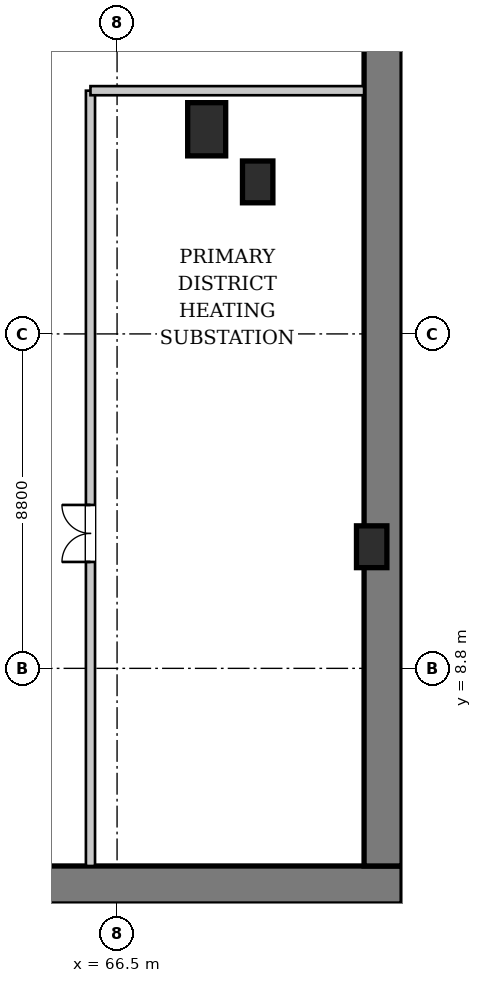
"""IFC4 building model, lengths in metres.
Left out: names, types, materials, properties, quantities, classifications, styles, units other than length and angle.
Written with IfcOpenShell. Run it as: python <this file> out.ifc"""

import sys

from ifc_helpers import new_model, si_unit, direction, frame, frame_2d, origin, origin_2d, place, context, subcontext, project, spatial, rectangle, extrude, source, transform, mapped, element, fill, save


model = new_model("IFC4")
c1 = context("Model", 3, precision=1e-05, world=origin(), true_north=direction((0.0, 1.0)))
c2 = subcontext(c1, "Body", "Model", "MODEL_VIEW")
j1 = project(units=[si_unit("LENGTHUNIT", "METRE"), si_unit("PLANEANGLEUNIT", "RADIAN")], contexts=[c1])
p1 = place(None, origin())
s1 = spatial("IfcSite", under=j1, at=p1, CompositionType="ELEMENT")
p2 = place(p1, origin())
s2 = spatial("IfcBuilding", under=s1, at=p2, CompositionType="ELEMENT")
p3 = place(p2, frame((0.0, 0.0, -9.6)))
s3 = spatial("IfcBuildingStorey", under=s2, at=p3, CompositionType="ELEMENT", Elevation=-9.6)
p4 = place(p3, frame((2.0, 3.1, 0.0), z_axis=(0.0, 0.0, 1.0), x_axis=(1.0, 0.0, 0.0)))
e1 = element("IfcWall", 1, at=p4, inside=s3, PredefinedType="SOLIDWALL", context=c2, shape_type="SweptSolid", body=[
    extrude(rectangle(XDim=72.0, YDim=1.0, at=frame_2d((36.0, 0.0))), origin(), (0.0, 0.0, 1.0), 4.45),
])
p5 = place(p3, frame((73.5, 3.6, 0.0), z_axis=(0.0, 0.0, 1.0), x_axis=(0.0, 1.0, 0.0)))
e2 = element("IfcWall", 2, at=p5, inside=s3, PredefinedType="SOLIDWALL", context=c2, shape_type="SweptSolid", body=[
    extrude(rectangle(XDim=46.0, YDim=1.0, at=frame_2d((23.0, 0.0))), origin(), (0.0, 0.0, 1.0), 4.45),
])
m1 = source(origin(), c2, "Body", "SweptSolid", [
    extrude(rectangle(XDim=1.0, YDim=1.4, at=origin_2d()), origin(), (0.0, 0.0, 1.0), 4.635),
])
p6 = place(p3, frame((68.858, 22.985, 0.0), z_axis=(0.0, 0.0, 1.0), x_axis=(1.0, 0.0, 0.0)))
e3 = element("IfcColumn", 3, at=p6, inside=s3, PredefinedType="COLUMN", context=c2, shape_type="MappedRepresentation", body=[
    mapped(m1, transform((0.0, 0.0, 0.0), x_axis=(1.0, 0.0, 0.0), y_axis=(0.0, 1.0, 0.0), z_axis=(0.0, 0.0, 1.0), scale=1.0)),
])
m2 = source(origin(), c2, "Body", "SweptSolid", [
    extrude(rectangle(XDim=0.8, YDim=1.1, at=origin_2d()), origin(), (0.0, 0.0, 1.0), 4.635),
])
for number, where, z_axis, x_axis in (
    (4, (73.2, 12.0, 0.0), (0.0, 0.0, 1.0), (1.0, 0.0, 0.0)),
    (5, (70.2, 21.6, 0.0), (0.0, 0.0, 1.0), (1.0, 0.0, 0.0)),
):
    element("IfcColumn", number, at=place(p3, frame(where, z_axis=z_axis, x_axis=x_axis)), inside=s3, PredefinedType="COLUMN", context=c2, shape_type="MappedRepresentation", body=[
        mapped(m2, transform((0.0, 0.0, 0.0), x_axis=(1.0, 0.0, 0.0), y_axis=(0.0, 1.0, 0.0), z_axis=(0.0, 0.0, 1.0), scale=1.0)),
    ])
p7 = place(p3, frame((65.8, 3.6, 0.0), z_axis=(0.0, 0.0, 1.0), x_axis=(0.0, 1.0, 0.0)))
e6 = element("IfcWall", 6, at=p7, inside=s3, PredefinedType="PARTITIONING", context=c2, shape_type="SweptSolid", body=[
    extrude(rectangle(XDim=20.4, YDim=0.24, at=frame_2d((10.2, 0.0))), origin(), (0.0, 0.0, 1.0), 4.45),
])
p8 = place(p7, frame((8.0, 0.0, 0.0)))
e7 = element("IfcOpeningElement", 7, at=p8, cuts=e6, PredefinedType="OPENING", context=c2, shape_type="SweptSolid", body=[
    extrude(rectangle(XDim=1.5, YDim=2.25, at=frame_2d((0.75, 1.125))), frame((0.0, 0.13, 0.0), z_axis=(0.0, -1.0, 0.0), x_axis=(1.0, 0.0, 0.0)), (0.0, 0.0, 1.0), 0.26),
])
p9 = place(p3, frame((65.8, 24.0, 0.0), z_axis=(0.0, 0.0, 1.0), x_axis=(1.0, 0.0, 0.0)))
e8 = element("IfcWall", 8, at=p9, inside=s3, PredefinedType="PARTITIONING", context=c2, shape_type="SweptSolid", body=[
    extrude(rectangle(XDim=7.2, YDim=0.24, at=frame_2d((3.6, 0.0))), origin(), (0.0, 0.0, 1.0), 4.45),
])
m3 = source(origin(), c2, "Body", "SweptSolid", [
    extrude(rectangle(XDim=1.5, YDim=2.25, at=frame_2d((0.75, 1.125))), frame((0.0, 0.025, 0.0), z_axis=(0.0, -1.0, 0.0), x_axis=(1.0, 0.0, 0.0)), (0.0, 0.0, 1.0), 0.05),
])
p10 = place(p8, origin())
e9 = element("IfcDoor", 9, at=p10, inside=s3, OperationType="DOUBLE_DOOR_SINGLE_SWING", PredefinedType="DOOR", context=c2, shape_type="MappedRepresentation", body=[
    mapped(m3, transform((0.0, 0.0, 0.0), x_axis=(1.0, 0.0, 0.0), y_axis=(0.0, 1.0, 0.0), z_axis=(0.0, 0.0, 1.0), scale=1.0)),
])
fill(e7, e9)
save(model, sys.argv[1])
